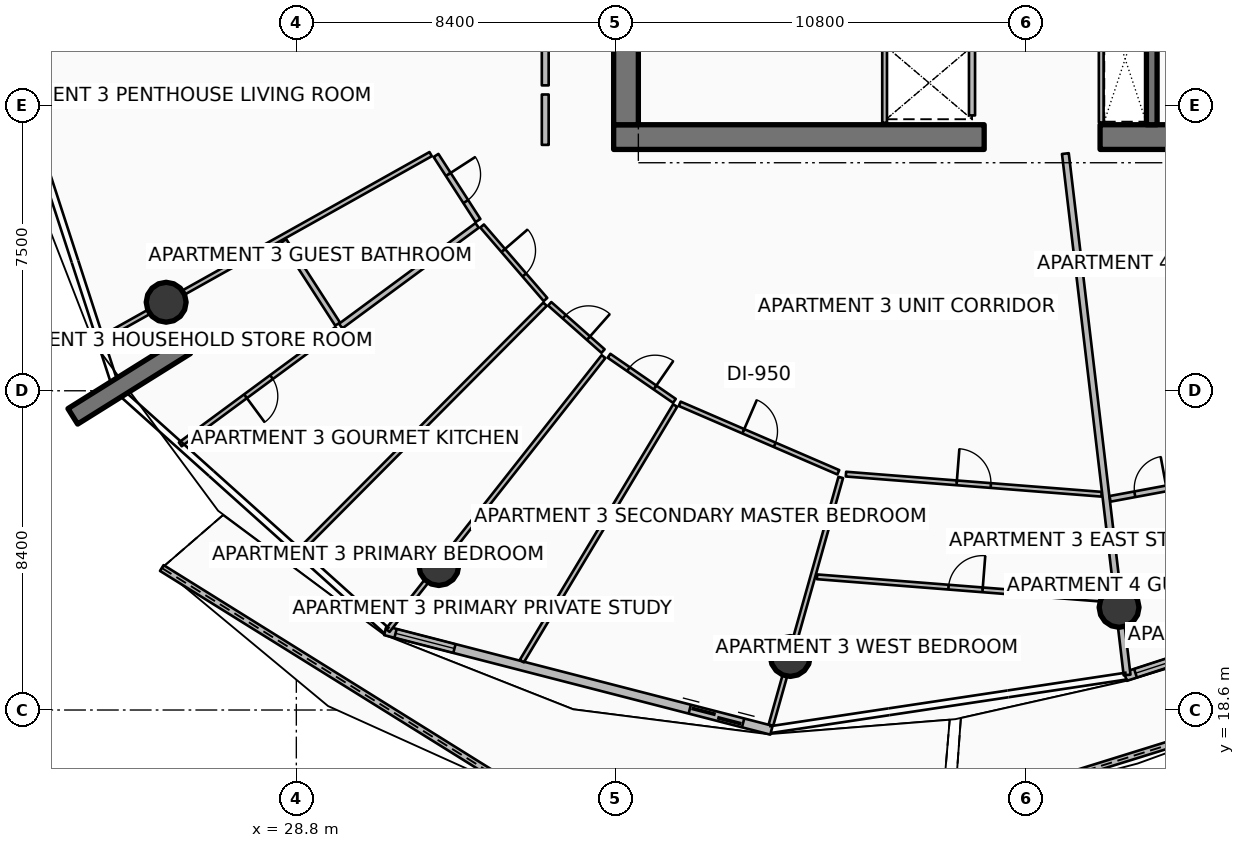
"""IFC4 building model, lengths in metres.
Left out: names, types, materials, properties, quantities, classifications, styles, units other than length and angle.
Written with IfcOpenShell. Run it as: python <this file> out.ifc"""

import sys

from ifc_helpers import new_model, si_unit, direction, frame, frame_2d, origin, origin_2d, place, context, subcontext, project, spatial, polyline, rectangle, circle, outline, extrude, element, fill, save


model = new_model("IFC4")
c1 = context("Model", 3, precision=1e-05, world=origin(), true_north=direction((0.0, 1.0)))
c2 = subcontext(c1, "Body", "Model", "MODEL_VIEW")
j1 = project(units=[si_unit("LENGTHUNIT", "METRE"), si_unit("PLANEANGLEUNIT", "RADIAN")], contexts=[c1])
p1 = place(None, origin())
s1 = spatial("IfcSite", under=j1, at=p1, CompositionType="ELEMENT")
p2 = place(p1, origin())
s2 = spatial("IfcBuilding", under=s1, at=p2, CompositionType="ELEMENT")
p3 = place(p2, frame((0.0, 0.0, 206.55)))
s3 = spatial("IfcBuildingStorey", under=s2, at=p3, CompositionType="ELEMENT", Elevation=206.55)
for number, where, z_axis, x_axis in (
    (1, (37.15, 33.675, 0.0), (0.0, 0.0, 1.0), (1.0, 0.0, 0.0)),
    (2, (49.95, 33.675, 0.0), (0.0, 0.0, 1.0), (1.0, 0.0, 0.0)),
):
    element("IfcWall", number, at=place(p3, frame(where, z_axis=z_axis, x_axis=x_axis)), inside=s3, PredefinedType="SHEAR", context=c2, shape_type="SweptSolid", body=[
        extrude(rectangle(XDim=9.75, YDim=0.65, at=frame_2d((4.875, 0.0))), origin(), (0.0, 0.0, 1.0), 3.75),
    ])
p4 = place(p3, frame((37.475, 34.0, 0.0), z_axis=(0.0, 0.0, 1.0), x_axis=(0.0, 1.0, 0.0)))
e3 = element("IfcWall", 3, at=p4, inside=s3, PredefinedType="SHEAR", context=c2, shape_type="SweptSolid", body=[
    extrude(rectangle(XDim=16.0, YDim=0.65, at=frame_2d((8.0, 0.0))), origin(), (0.0, 0.0, 1.0), 3.75),
])
p5 = place(p3, frame((51.31, 34.0, 0.0), z_axis=(0.0, 0.0, 1.0), x_axis=(0.0, 1.0, 0.0)))
e4 = element("IfcWall", 4, at=p5, inside=s3, PredefinedType="SHEAR", context=c2, shape_type="SweptSolid", body=[
    extrude(rectangle(XDim=3.5, YDim=0.28, at=frame_2d((1.75, 0.0))), origin(), (0.0, 0.0, 1.0), 3.75),
])
p6 = place(p3, frame((25.886, 28.182, 0.0), z_axis=(0.0, 0.0, 1.0), x_axis=(-0.848033572426, -0.529942506352, 0.0)))
e5 = element("IfcWall", 5, at=p6, inside=s3, PredefinedType="SOLIDWALL", context=c2, shape_type="SweptSolid", body=[
    extrude(rectangle(XDim=3.5, YDim=0.48, at=frame_2d((1.75, 0.0))), origin(), (0.0, 0.0, 1.0), 3.75),
])
for number, where, z_axis, x_axis in (
    (6, (25.375, 29.329, 0.0), (0.0, 0.0, 1.0), (1.0, 0.0, 0.0)),
    (7, (32.549, 22.401, 0.0), (0.0, 0.0, 1.0), (1.0, 0.0, 0.0)),
    (8, (41.798, 20.008, 0.0), (0.0, 0.0, 1.0), (1.0, 0.0, 0.0)),
    (9, (50.45, 21.3, 0.0), (0.0, 0.0, 1.0), (1.0, 0.0, 0.0)),
):
    element("IfcColumn", number, at=place(p3, frame(where, z_axis=z_axis, x_axis=x_axis)), inside=s3, PredefinedType="COLUMN", context=c2, shape_type="SweptSolid", body=[
        extrude(circle(Radius=0.525, at=origin_2d()), origin(), (0.0, 0.0, 1.0), 3.5),
    ])
p7 = place(p3, frame((25.26, 22.336, 0.0), z_axis=(0.0, 0.0, 1.0), x_axis=(0.84875531388, -0.528785795158, 0.0)))
e10 = element("IfcWall", 10, at=p7, inside=s3, PredefinedType="PARAPET", context=c2, shape_type="SweptSolid", body=[
    extrude(outline(polyline([(0.0, 0.0), (11.257, 0.0), (11.257, 1.832), (5.628, 1.696), (0.0, 1.497), (0.0, 0.0)])), frame((0.0, 0.09, 0.0), z_axis=(0.0, -1.0, 0.0), x_axis=(1.0, 0.0, 0.0)), (0.0, 0.0, 1.0), 0.18),
])
p8 = place(p3, frame((46.108, 15.929, 0.0), z_axis=(0.0, 0.0, 1.0), x_axis=(0.954909554677, 0.296896854793, 0.0)))
e11 = element("IfcWall", 11, at=p8, inside=s3, PredefinedType="PARAPET", context=c2, shape_type="SweptSolid", body=[
    extrude(outline(polyline([(0.0, 0.0), (9.736, 0.0), (9.736, 1.348), (4.868, 1.562), (0.0, 1.747), (0.0, 0.0)])), frame((0.0, 0.09, 0.0), z_axis=(0.0, -1.0, 0.0), x_axis=(1.0, 0.0, 0.0)), (0.0, 0.0, 1.0), 0.18),
])
p9 = place(p3, frame((31.14, 20.687, 0.0), z_axis=(0.0, 0.0, 1.0), x_axis=(0.968374028006, -0.249502989727, 0.0)))
e12 = element("IfcWall", 12, at=p9, inside=s3, PredefinedType="SOLIDWALL", context=c2, shape_type="SweptSolid", body=[
    extrude(rectangle(XDim=10.494, YDim=0.24, at=frame_2d((5.247, 0.0))), origin(), (0.0, 0.0, 1.0), 2.45),
])
p10 = place(p9, frame((8.274, 0.0, 0.0)))
e13 = element("IfcOpeningElement", 13, at=p10, cuts=e12, PredefinedType="OPENING", context=c2, shape_type="SweptSolid", body=[
    extrude(rectangle(XDim=1.45, YDim=2.15, at=frame_2d((0.725, 1.075))), frame((0.0, 0.13, 0.0), z_axis=(0.0, -1.0, 0.0), x_axis=(1.0, 0.0, 0.0)), (0.0, 0.0, 1.0), 0.26),
])
p11 = place(p9, frame((0.28, 0.0, 0.65)))
e14 = element("IfcOpeningElement", 14, at=p11, cuts=e12, PredefinedType="OPENING", context=c2, shape_type="SweptSolid", body=[
    extrude(rectangle(XDim=1.6, YDim=1.5, at=frame_2d((0.8, 0.75))), frame((0.0, 0.13, 0.0), z_axis=(0.0, -1.0, 0.0), x_axis=(1.0, 0.0, 0.0)), (0.0, 0.0, 1.0), 0.26),
])
p12 = place(p3, frame((50.616, 19.481, 0.0), z_axis=(0.0, 0.0, 1.0), x_axis=(0.951058543936, 0.309010753869, 0.0)))
e15 = element("IfcWall", 15, at=p12, inside=s3, PredefinedType="SOLIDWALL", context=c2, shape_type="SweptSolid", body=[
    extrude(rectangle(XDim=8.942, YDim=0.24, at=frame_2d((4.471, 0.0))), origin(), (0.0, 0.0, 1.0), 2.45),
])
p13 = place(p12, frame((6.722, 0.0, 0.0)))
e16 = element("IfcOpeningElement", 16, at=p13, cuts=e15, PredefinedType="OPENING", context=c2, shape_type="SweptSolid", body=[
    extrude(rectangle(XDim=1.45, YDim=2.15, at=frame_2d((0.725, 1.075))), frame((0.0, 0.13, 0.0), z_axis=(0.0, -1.0, 0.0), x_axis=(1.0, 0.0, 0.0)), (0.0, 0.0, 1.0), 0.26),
])
p14 = place(p12, frame((0.28, 0.0, 0.65)))
e17 = element("IfcOpeningElement", 17, at=p14, cuts=e15, PredefinedType="OPENING", context=c2, shape_type="SweptSolid", body=[
    extrude(rectangle(XDim=1.6, YDim=1.5, at=frame_2d((0.8, 0.75))), frame((0.0, 0.13, 0.0), z_axis=(0.0, -1.0, 0.0), x_axis=(1.0, 0.0, 0.0)), (0.0, 0.0, 1.0), 0.26),
])
p15 = place(p3, frame((46.58, 34.245, 0.0), z_axis=(0.0, 0.0, 1.0), x_axis=(0.0, 1.0, 0.0)))
e18 = element("IfcWall", 18, at=p15, inside=s3, PredefinedType="PARTITIONING", context=c2, shape_type="SweptSolid", body=[
    extrude(rectangle(XDim=1.71, YDim=0.16, at=frame_2d((0.855, 0.0))), origin(), (0.0, 0.0, 1.0), 3.5),
])
p16 = place(p3, frame((44.28, 34.05, 0.0), z_axis=(0.0, 0.0, 1.0), x_axis=(0.0, 1.0, 0.0)))
e19 = element("IfcWall", 19, at=p16, inside=s3, PredefinedType="PARTITIONING", context=c2, shape_type="SweptSolid", body=[
    extrude(rectangle(XDim=2.03, YDim=0.125, at=frame_2d((1.015, 0.0))), origin(), (0.0, 0.0, 1.0), 2.94),
])
p17 = place(p3, frame((49.98, 34.06, 0.0), z_axis=(0.0, 0.0, 1.0), x_axis=(0.0, 1.0, 0.0)))
e20 = element("IfcWall", 20, at=p17, inside=s3, PredefinedType="PARTITIONING", context=c2, shape_type="SweptSolid", body=[
    extrude(rectangle(XDim=3.4, YDim=0.125, at=frame_2d((1.7, 0.0))), origin(), (0.0, 0.0, 1.0), 2.94),
])
p18 = place(p3, frame((49.037, 33.241, 0.0), z_axis=(0.0, 0.0, 1.0), x_axis=(0.11753742895, -0.993068453228, 0.0)))
e21 = element("IfcWall", 21, at=p18, inside=s3, PredefinedType="PARTITIONING", context=c2, shape_type="SweptSolid", body=[
    extrude(rectangle(XDim=13.815, YDim=0.18, at=frame_2d((6.907, 0.0))), origin(), (0.0, 0.0, 1.0), 2.94),
])
p19 = place(p3, frame((35.35, 40.383, 0.0), z_axis=(0.0, 0.0, 1.0), x_axis=(0.0, -1.0, 0.0)))
e22 = element("IfcWall", 22, at=p19, inside=s3, PredefinedType="PARTITIONING", context=c2, shape_type="SweptSolid", body=[
    extrude(rectangle(XDim=5.347, YDim=0.18, at=frame_2d((2.674, 0.0))), origin(), (0.0, 0.0, 1.0), 2.94),
])
p20 = place(p19, frame((2.124, 0.0, 0.0)))
e23 = element("IfcOpeningElement", 23, at=p20, cuts=e22, PredefinedType="OPENING", context=c2, shape_type="SweptSolid", body=[
    extrude(rectangle(XDim=1.1, YDim=2.1, at=frame_2d((0.55, 1.05))), frame((0.0, 0.1, 0.0), z_axis=(0.0, -1.0, 0.0), x_axis=(1.0, 0.0, 0.0)), (0.0, 0.0, 1.0), 0.2),
])
p21 = place(p3, frame((35.35, 34.796, 0.0), z_axis=(0.0, 0.0, 1.0), x_axis=(0.0, -1.0, 0.0)))
e24 = element("IfcWall", 24, at=p21, inside=s3, PredefinedType="PARTITIONING", context=c2, shape_type="SweptSolid", body=[
    extrude(rectangle(XDim=1.326, YDim=0.18, at=frame_2d((0.663, 0.0))), origin(), (0.0, 0.0, 1.0), 2.94),
])
p22 = place(p3, frame((32.334, 33.227, 0.0), z_axis=(0.0, 0.0, 1.0), x_axis=(-0.872500152392, -0.488613839424, 0.0)))
e25 = element("IfcWall", 25, at=p22, inside=s3, PredefinedType="PARTITIONING", context=c2, shape_type="SweptSolid", body=[
    extrude(rectangle(XDim=9.94, YDim=0.125, at=frame_2d((4.97, 0.0))), origin(), (0.0, 0.0, 1.0), 2.94),
])
p23 = place(p3, frame((32.476, 33.192, 0.0), z_axis=(0.0, 0.0, 1.0), x_axis=(0.542143239932, -0.840286086637, 0.0)))
e26 = element("IfcWall", 26, at=p23, inside=s3, PredefinedType="PARTITIONING", context=c2, shape_type="SweptSolid", body=[
    extrude(rectangle(XDim=2.038, YDim=0.15, at=frame_2d((1.019, 0.0))), origin(), (0.0, 0.0, 1.0), 2.94),
])
p24 = place(p23, frame((0.594, 0.0, 0.0)))
e27 = element("IfcOpeningElement", 27, at=p24, cuts=e26, PredefinedType="OPENING", context=c2, shape_type="SweptSolid", body=[
    extrude(rectangle(XDim=0.85, YDim=2.06, at=frame_2d((0.425, 1.03))), frame((0.0, 0.085, 0.0), z_axis=(0.0, -1.0, 0.0), x_axis=(1.0, 0.0, 0.0)), (0.0, 0.0, 1.0), 0.17),
])
p25 = place(p3, frame((28.471, 30.949, 0.0), z_axis=(0.0, 0.0, 1.0), x_axis=(0.542080018781, -0.840326872853, 0.0)))
e28 = element("IfcWall", 28, at=p25, inside=s3, PredefinedType="PARTITIONING", context=c2, shape_type="SweptSolid", body=[
    extrude(rectangle(XDim=2.611, YDim=0.15, at=frame_2d((1.306, 0.0))), origin(), (0.0, 0.0, 1.0), 2.94),
])
p26 = place(p3, frame((33.557, 31.35, 0.0), z_axis=(0.0, 0.0, 1.0), x_axis=(-0.804841149106, -0.593490290322, 0.0)))
e29 = element("IfcWall", 29, at=p26, inside=s3, PredefinedType="PARTITIONING", context=c2, shape_type="SweptSolid", body=[
    extrude(rectangle(XDim=4.46, YDim=0.15, at=frame_2d((2.23, 0.0))), origin(), (0.0, 0.0, 1.0), 2.94),
])
p27 = place(p3, frame((29.863, 28.626, 0.0), z_axis=(0.0, 0.0, 1.0), x_axis=(-0.804842237675, -0.593488814094, 0.0)))
e30 = element("IfcWall", 30, at=p27, inside=s3, PredefinedType="PARTITIONING", context=c2, shape_type="SweptSolid", body=[
    extrude(rectangle(XDim=5.115, YDim=0.125, at=frame_2d((2.558, 0.0))), origin(), (0.0, 0.0, 1.0), 2.94),
])
p28 = place(p27, frame((2.133, 0.0, 0.0)))
e31 = element("IfcOpeningElement", 31, at=p28, cuts=e30, PredefinedType="OPENING", context=c2, shape_type="SweptSolid", body=[
    extrude(rectangle(XDim=0.85, YDim=2.06, at=frame_2d((0.425, 1.03))), frame((0.0, 0.073, 0.0), z_axis=(0.0, -1.0, 0.0), x_axis=(1.0, 0.0, 0.0)), (0.0, 0.0, 1.0), 0.145),
])
p29 = place(p3, frame((35.344, 29.277, 0.0), z_axis=(0.0, 0.0, 1.0), x_axis=(-0.705226489462, -0.708982086206, 0.0)))
e32 = element("IfcWall", 32, at=p29, inside=s3, PredefinedType="PARTITIONING", context=c2, shape_type="SweptSolid", body=[
    extrude(rectangle(XDim=9.166, YDim=0.125, at=frame_2d((4.583, 0.0))), origin(), (0.0, 0.0, 1.0), 2.94),
])
p30 = place(p3, frame((33.688, 31.335, 0.0), z_axis=(0.0, 0.0, 1.0), x_axis=(0.653119308398, -0.757255022431, 0.0)))
e33 = element("IfcWall", 33, at=p30, inside=s3, PredefinedType="PARTITIONING", context=c2, shape_type="SweptSolid", body=[
    extrude(rectangle(XDim=2.553, YDim=0.125, at=frame_2d((1.277, 0.0))), origin(), (0.0, 0.0, 1.0), 2.94),
])
p31 = place(p30, frame((0.852, 0.0, 0.0)))
e34 = element("IfcOpeningElement", 34, at=p31, cuts=e33, PredefinedType="OPENING", context=c2, shape_type="SweptSolid", body=[
    extrude(rectangle(XDim=0.85, YDim=2.06, at=frame_2d((0.425, 1.03))), frame((0.0, 0.073, 0.0), z_axis=(0.0, -1.0, 0.0), x_axis=(1.0, 0.0, 0.0)), (0.0, 0.0, 1.0), 0.145),
])
p32 = place(p3, frame((35.468, 29.288, 0.0), z_axis=(0.0, 0.0, 1.0), x_axis=(0.748399816021, -0.663247853656, 0.0)))
e35 = element("IfcWall", 35, at=p32, inside=s3, PredefinedType="PARTITIONING", context=c2, shape_type="SweptSolid", body=[
    extrude(rectangle(XDim=1.875, YDim=0.125, at=frame_2d((0.938, 0.0))), origin(), (0.0, 0.0, 1.0), 2.94),
])
p33 = place(p32, frame((0.512, 0.0, 0.0)))
e36 = element("IfcOpeningElement", 36, at=p33, cuts=e35, PredefinedType="OPENING", context=c2, shape_type="SweptSolid", body=[
    extrude(rectangle(XDim=0.85, YDim=2.06, at=frame_2d((0.425, 1.03))), frame((0.0, 0.073, 0.0), z_axis=(0.0, -1.0, 0.0), x_axis=(1.0, 0.0, 0.0)), (0.0, 0.0, 1.0), 0.145),
])
p34 = place(p3, frame((36.884, 27.9, 0.0), z_axis=(0.0, 0.0, 1.0), x_axis=(-0.619094580594, -0.785316433216, 0.0)))
e37 = element("IfcWall", 37, at=p34, inside=s3, PredefinedType="PARTITIONING", context=c2, shape_type="SweptSolid", body=[
    extrude(rectangle(XDim=9.175, YDim=0.125, at=frame_2d((4.588, 0.0))), origin(), (0.0, 0.0, 1.0), 2.94),
])
p35 = place(p3, frame((38.768, 26.612, 0.0), z_axis=(0.0, 0.0, 1.0), x_axis=(-0.514431677275, -0.857531369348, 0.0)))
e38 = element("IfcWall", 38, at=p35, inside=s3, PredefinedType="PARTITIONING", context=c2, shape_type="SweptSolid", body=[
    extrude(rectangle(XDim=7.844, YDim=0.125, at=frame_2d((3.922, 0.0))), origin(), (0.0, 0.0, 1.0), 2.94),
])
p36 = place(p3, frame((37.028, 27.921, 0.0), z_axis=(0.0, 0.0, 1.0), x_axis=(0.823103592367, -0.567891253879, 0.0)))
e39 = element("IfcWall", 39, at=p36, inside=s3, PredefinedType="PARTITIONING", context=c2, shape_type="SweptSolid", body=[
    extrude(rectangle(XDim=2.09, YDim=0.125, at=frame_2d((1.045, 0.0))), origin(), (0.0, 0.0, 1.0), 2.94),
])
p37 = place(p36, frame((0.62, 0.0, 0.0)))
e40 = element("IfcOpeningElement", 40, at=p37, cuts=e39, PredefinedType="OPENING", context=c2, shape_type="SweptSolid", body=[
    extrude(rectangle(XDim=0.85, YDim=2.06, at=frame_2d((0.425, 1.03))), frame((0.0, 0.073, 0.0), z_axis=(0.0, -1.0, 0.0), x_axis=(1.0, 0.0, 0.0)), (0.0, 0.0, 1.0), 0.145),
])
p38 = place(p3, frame((38.888, 26.657, 0.0), z_axis=(0.0, 0.0, 1.0), x_axis=(0.918052580004, -0.396458648976, 0.0)))
e41 = element("IfcWall", 41, at=p38, inside=s3, PredefinedType="PARTITIONING", context=c2, shape_type="SweptSolid", body=[
    extrude(rectangle(XDim=4.546, YDim=0.125, at=frame_2d((2.273, 0.0))), origin(), (0.0, 0.0, 1.0), 2.94),
])
p39 = place(p38, frame((1.823, 0.0, 0.0)))
e42 = element("IfcOpeningElement", 42, at=p39, cuts=e41, PredefinedType="OPENING", context=c2, shape_type="SweptSolid", body=[
    extrude(rectangle(XDim=0.9, YDim=2.08, at=frame_2d((0.45, 1.04))), frame((0.0, 0.073, 0.0), z_axis=(0.0, -1.0, 0.0), x_axis=(1.0, 0.0, 0.0)), (0.0, 0.0, 1.0), 0.145),
])
p40 = place(p3, frame((43.126, 24.719, 0.0), z_axis=(0.0, 0.0, 1.0), x_axis=(-0.271429339147, -0.962458369931, 0.0)))
e43 = element("IfcWall", 43, at=p40, inside=s3, PredefinedType="PARTITIONING", context=c2, shape_type="SweptSolid", body=[
    extrude(rectangle(XDim=6.772, YDim=0.125, at=frame_2d((3.386, 0.0))), origin(), (0.0, 0.0, 1.0), 2.94),
])
p41 = place(p3, frame((43.263, 24.807, 0.0), z_axis=(0.0, 0.0, 1.0), x_axis=(0.996914936791, -0.078489545824, 0.0)))
e44 = element("IfcWall", 44, at=p41, inside=s3, PredefinedType="PARTITIONING", context=c2, shape_type="SweptSolid", body=[
    extrude(rectangle(XDim=6.747, YDim=0.125, at=frame_2d((3.373, 0.0))), origin(), (0.0, 0.0, 1.0), 2.94),
])
p42 = place(p41, frame((2.923, 0.0, 0.0)))
e45 = element("IfcOpeningElement", 45, at=p42, cuts=e44, PredefinedType="OPENING", context=c2, shape_type="SweptSolid", body=[
    extrude(rectangle(XDim=0.9, YDim=2.08, at=frame_2d((0.45, 1.04))), frame((0.0, 0.073, 0.0), z_axis=(0.0, -1.0, 0.0), x_axis=(1.0, 0.0, 0.0)), (0.0, 0.0, 1.0), 0.145),
])
p43 = place(p3, frame((42.501, 22.105, 0.0), z_axis=(0.0, 0.0, 1.0), x_axis=(0.996917595152, -0.078455774017, 0.0)))
e46 = element("IfcWall", 46, at=p43, inside=s3, PredefinedType="PARTITIONING", context=c2, shape_type="SweptSolid", body=[
    extrude(rectangle(XDim=7.842, YDim=0.125, at=frame_2d((3.921, 0.0))), origin(), (0.0, 0.0, 1.0), 2.94),
])
p44 = place(p43, frame((3.471, 0.0, 0.0)))
e47 = element("IfcOpeningElement", 47, at=p44, cuts=e46, PredefinedType="OPENING", context=c2, shape_type="SweptSolid", body=[
    extrude(rectangle(XDim=0.9, YDim=2.08, at=frame_2d((0.45, 1.04))), frame((0.0, 0.073, 0.0), z_axis=(0.0, -1.0, 0.0), x_axis=(1.0, 0.0, 0.0)), (0.0, 0.0, 1.0), 0.145),
])
p45 = place(p3, frame((50.212, 24.156, 0.0), z_axis=(0.0, 0.0, 1.0), x_axis=(0.983198523617, 0.182539483832, 0.0)))
e48 = element("IfcWall", 48, at=p45, inside=s3, PredefinedType="PARTITIONING", context=c2, shape_type="SweptSolid", body=[
    extrude(rectangle(XDim=2.175, YDim=0.15, at=frame_2d((1.087, 0.0))), origin(), (0.0, 0.0, 1.0), 2.94),
])
p46 = place(p45, frame((0.662, 0.0, 0.0)))
e49 = element("IfcOpeningElement", 49, at=p46, cuts=e48, PredefinedType="OPENING", context=c2, shape_type="SweptSolid", body=[
    extrude(rectangle(XDim=0.85, YDim=2.06, at=frame_2d((0.425, 1.03))), frame((0.0, 0.085, 0.0), z_axis=(0.0, -1.0, 0.0), x_axis=(1.0, 0.0, 0.0)), (0.0, 0.0, 1.0), 0.17),
])
p47 = place(p10, origin())
e50 = element("IfcDoor", 50, at=p47, inside=s3, OperationType="DOUBLE_DOOR_SLIDING", PredefinedType="DOOR", context=c2, shape_type="SweptSolid", body=[
    extrude(rectangle(XDim=1.45, YDim=2.15, at=frame_2d((0.725, 1.075))), frame((0.0, 0.025, 0.0), z_axis=(0.0, -1.0, 0.0), x_axis=(1.0, 0.0, 0.0)), (0.0, 0.0, 1.0), 0.05),
])
fill(e13, e50)
p48 = place(p11, origin())
e51 = element("IfcWindow", 51, at=p48, inside=s3, PartitioningType="SINGLE_PANEL", PredefinedType="WINDOW", context=c2, shape_type="SweptSolid", body=[
    extrude(rectangle(XDim=1.6, YDim=1.5, at=frame_2d((0.8, 0.75))), frame((0.0, 0.03, 0.0), z_axis=(0.0, -1.0, 0.0), x_axis=(1.0, 0.0, 0.0)), (0.0, 0.0, 1.0), 0.06),
])
fill(e14, e51)
p49 = place(p14, origin())
e52 = element("IfcWindow", 52, at=p49, inside=s3, PartitioningType="SINGLE_PANEL", PredefinedType="WINDOW", context=c2, shape_type="SweptSolid", body=[
    extrude(rectangle(XDim=1.6, YDim=1.5, at=frame_2d((0.8, 0.75))), frame((0.0, 0.03, 0.0), z_axis=(0.0, -1.0, 0.0), x_axis=(1.0, 0.0, 0.0)), (0.0, 0.0, 1.0), 0.06),
])
fill(e17, e52)
p50 = place(p24, origin())
e53 = element("IfcDoor", 53, at=p50, inside=s3, OperationType="SINGLE_SWING_LEFT", PredefinedType="DOOR", context=c2, shape_type="SweptSolid", body=[
    extrude(rectangle(XDim=0.85, YDim=2.06, at=frame_2d((0.425, 1.03))), frame((0.0, 0.025, 0.0), z_axis=(0.0, -1.0, 0.0), x_axis=(1.0, 0.0, 0.0)), (0.0, 0.0, 1.0), 0.05),
])
fill(e27, e53)
p51 = place(p28, origin())
e54 = element("IfcDoor", 54, at=p51, inside=s3, OperationType="SINGLE_SWING_RIGHT", PredefinedType="DOOR", context=c2, shape_type="SweptSolid", body=[
    extrude(rectangle(XDim=0.85, YDim=2.06, at=frame_2d((0.425, 1.03))), frame((0.0, 0.025, 0.0), z_axis=(0.0, -1.0, 0.0), x_axis=(1.0, 0.0, 0.0)), (0.0, 0.0, 1.0), 0.05),
])
fill(e31, e54)
p52 = place(p31, origin())
e55 = element("IfcDoor", 55, at=p52, inside=s3, OperationType="SINGLE_SWING_LEFT", PredefinedType="DOOR", context=c2, shape_type="SweptSolid", body=[
    extrude(rectangle(XDim=0.85, YDim=2.06, at=frame_2d((0.425, 1.03))), frame((0.0, 0.025, 0.0), z_axis=(0.0, -1.0, 0.0), x_axis=(1.0, 0.0, 0.0)), (0.0, 0.0, 1.0), 0.05),
])
fill(e34, e55)
p53 = place(p33, origin())
e56 = element("IfcDoor", 56, at=p53, inside=s3, OperationType="SINGLE_SWING_RIGHT", PredefinedType="DOOR", context=c2, shape_type="SweptSolid", body=[
    extrude(rectangle(XDim=0.85, YDim=2.06, at=frame_2d((0.425, 1.03))), frame((0.0, 0.025, 0.0), z_axis=(0.0, -1.0, 0.0), x_axis=(1.0, 0.0, 0.0)), (0.0, 0.0, 1.0), 0.05),
])
fill(e36, e56)
p54 = place(p37, origin())
e57 = element("IfcDoor", 57, at=p54, inside=s3, OperationType="SINGLE_SWING_RIGHT", PredefinedType="DOOR", context=c2, shape_type="SweptSolid", body=[
    extrude(rectangle(XDim=0.85, YDim=2.06, at=frame_2d((0.425, 1.03))), frame((0.0, 0.025, 0.0), z_axis=(0.0, -1.0, 0.0), x_axis=(1.0, 0.0, 0.0)), (0.0, 0.0, 1.0), 0.05),
])
fill(e40, e57)
p55 = place(p39, origin())
e58 = element("IfcDoor", 58, at=p55, inside=s3, OperationType="SINGLE_SWING_LEFT", PredefinedType="DOOR", context=c2, shape_type="SweptSolid", body=[
    extrude(rectangle(XDim=0.9, YDim=2.08, at=frame_2d((0.45, 1.04))), frame((0.0, 0.025, 0.0), z_axis=(0.0, -1.0, 0.0), x_axis=(1.0, 0.0, 0.0)), (0.0, 0.0, 1.0), 0.05),
])
fill(e42, e58)
p56 = place(p42, origin())
e59 = element("IfcDoor", 59, at=p56, inside=s3, OperationType="SINGLE_SWING_LEFT", PredefinedType="DOOR", context=c2, shape_type="SweptSolid", body=[
    extrude(rectangle(XDim=0.9, YDim=2.08, at=frame_2d((0.45, 1.04))), frame((0.0, 0.025, 0.0), z_axis=(0.0, -1.0, 0.0), x_axis=(1.0, 0.0, 0.0)), (0.0, 0.0, 1.0), 0.05),
])
fill(e45, e59)
p57 = place(p44, origin())
e60 = element("IfcDoor", 60, at=p57, inside=s3, OperationType="SINGLE_SWING_RIGHT", PredefinedType="DOOR", context=c2, shape_type="SweptSolid", body=[
    extrude(rectangle(XDim=0.9, YDim=2.08, at=frame_2d((0.45, 1.04))), frame((0.0, 0.025, 0.0), z_axis=(0.0, -1.0, 0.0), x_axis=(1.0, 0.0, 0.0)), (0.0, 0.0, 1.0), 0.05),
])
fill(e47, e60)
p58 = place(p46, origin())
e61 = element("IfcDoor", 61, at=p58, inside=s3, OperationType="SINGLE_SWING_RIGHT", PredefinedType="DOOR", context=c2, shape_type="SweptSolid", body=[
    extrude(rectangle(XDim=0.85, YDim=2.06, at=frame_2d((0.425, 1.03))), frame((0.0, 0.025, 0.0), z_axis=(0.0, -1.0, 0.0), x_axis=(1.0, 0.0, 0.0)), (0.0, 0.0, 1.0), 0.05),
])
fill(e49, e61)
save(model, sys.argv[1])
